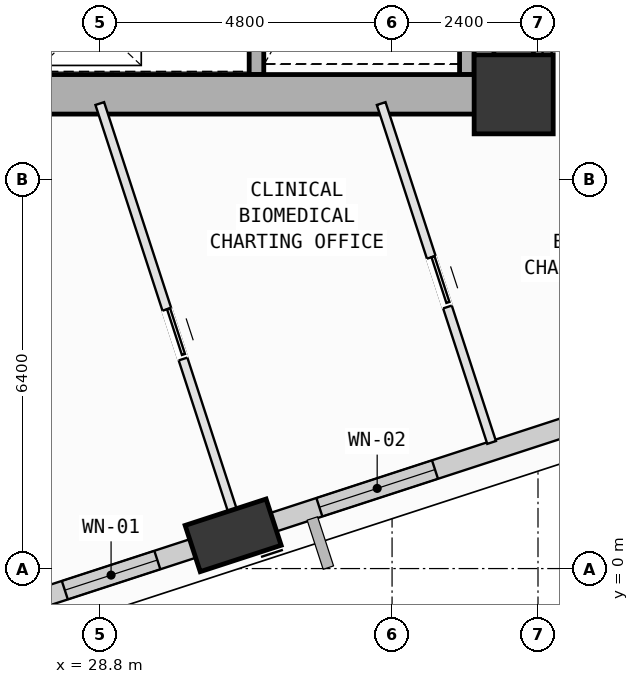
"""IFC4 building model, lengths in metres.
Left out: names, types, materials, properties, quantities, classifications, styles, units other than length and angle.
Written with IfcOpenShell. Run it as: python <this file> out.ifc"""

import sys

from ifc_helpers import new_model, si_unit, direction, frame, frame_2d, origin, origin_2d, place, context, subcontext, project, spatial, rectangle, extrude, element, fill, save


model = new_model("IFC4")
c1 = context("Model", 3, precision=1e-05, world=origin(), true_north=direction((0.0, 1.0)))
c2 = subcontext(c1, "Body", "Model", "MODEL_VIEW")
j1 = project(units=[si_unit("LENGTHUNIT", "METRE"), si_unit("PLANEANGLEUNIT", "RADIAN")], contexts=[c1])
p1 = place(None, origin())
s1 = spatial("IfcSite", under=j1, at=p1, CompositionType="ELEMENT")
p2 = place(p1, origin())
s2 = spatial("IfcBuilding", under=s1, at=p2, CompositionType="ELEMENT")
p3 = place(p2, frame((0.0, 0.0, 100.4)))
s3 = spatial("IfcBuildingStorey", under=s2, at=p3, CompositionType="ELEMENT", Elevation=100.4)
p4 = place(p3, frame((35.6, 7.8, 0.0), z_axis=(0.0, 0.0, 1.0), x_axis=(1.0, 0.0, 0.0)))
e1 = element("IfcColumn", 1, at=p4, inside=s3, PredefinedType="COLUMN", context=c2, shape_type="SweptSolid", body=[
    extrude(rectangle(XDim=1.3, YDim=1.3, at=origin_2d()), origin(), (0.0, 0.0, 1.0), 4.0),
])
p5 = place(p3, frame((30.986, 0.547, 0.002), z_axis=(0.100106568416, -0.00996811003, 0.994926787127), x_axis=(-0.212549228586, 0.976653054141, 0.031171096607)))
e2 = element("IfcColumn", 2, at=p5, inside=s3, PredefinedType="COLUMN", context=c2, shape_type="SweptSolid", body=[
    extrude(rectangle(XDim=1.4, YDim=0.8, at=origin_2d()), origin(), (0.0, 0.0, 1.0), 4.017),
])
p6 = place(p3, frame((30.697, 0.452, 0.0), z_axis=(0.0, 0.0, 1.0), x_axis=(-0.950788287958, -0.309841300479, 0.0)))
e3 = element("IfcWall", 3, at=p6, inside=s3, PredefinedType="SOLIDWALL", context=c2, shape_type="SweptSolid", body=[
    extrude(rectangle(XDim=6.234, YDim=0.32, at=frame_2d((3.117, 0.0))), origin(), (0.0, 0.0, 1.0), 3.165),
])
p7 = place(p6, frame((1.007, 0.0, 0.75)))
e4 = element("IfcOpeningElement", 4, at=p7, cuts=e3, PredefinedType="OPENING", context=c2, shape_type="SweptSolid", body=[
    extrude(rectangle(XDim=1.6, YDim=1.95, at=frame_2d((0.8, 0.975))), frame((0.0, 0.17, 0.0), z_axis=(0.0, -1.0, 0.0), x_axis=(1.0, 0.0, 0.0)), (0.0, 0.0, 1.0), 0.34),
])
p8 = place(p3, frame((37.536, 2.681, 0.0), z_axis=(0.0, 0.0, 1.0), x_axis=(-0.950795017796, -0.309820648334, 0.0)))
e5 = element("IfcWall", 5, at=p8, inside=s3, PredefinedType="SOLIDWALL", context=c2, shape_type="SweptSolid", body=[
    extrude(rectangle(XDim=6.214, YDim=0.32, at=frame_2d((3.107, 0.0))), origin(), (0.0, 0.0, 1.0), 3.165),
])
p9 = place(p8, frame((3.397, 0.0, 0.75)))
e6 = element("IfcOpeningElement", 6, at=p9, cuts=e5, PredefinedType="OPENING", context=c2, shape_type="SweptSolid", body=[
    extrude(rectangle(XDim=2.0, YDim=1.95, at=frame_2d((1.0, 0.975))), frame((0.0, 0.17, 0.0), z_axis=(0.0, -1.0, 0.0), x_axis=(1.0, 0.0, 0.0)), (0.0, 0.0, 1.0), 0.34),
])
for number, where, z_axis, x_axis in (
    (7, (34.83, 15.12, 0.0), (0.0, 0.0, 1.0), (0.0, -1.0, 0.0)),
    (8, (31.37, 8.125, 0.0), (0.0, 0.0, 1.0), (0.0, 1.0, 0.0)),
):
    element("IfcWall", number, at=place(p3, frame(where, z_axis=z_axis, x_axis=x_axis)), inside=s3, PredefinedType="SOLIDWALL", context=c2, shape_type="SweptSolid", body=[
        extrude(rectangle(XDim=6.995, YDim=0.24, at=frame_2d((3.498, 0.0))), origin(), (0.0, 0.0, 1.0), 3.78),
    ])
p10 = place(p3, frame((24.8, 7.8, 0.0), z_axis=(0.0, 0.0, 1.0), x_axis=(1.0, 0.0, 0.0)))
e9 = element("IfcWall", 9, at=p10, inside=s3, PredefinedType="SHEAR", context=c2, shape_type="SweptSolid", body=[
    extrude(rectangle(XDim=10.8, YDim=0.65, at=frame_2d((5.4, 0.0))), origin(), (0.0, 0.0, 1.0), 3.78),
])
p11 = place(p3, frame((35.6, 7.8, 0.0), z_axis=(0.0, 0.0, 1.0), x_axis=(0.0, 1.0, 0.0)))
e10 = element("IfcWall", 10, at=p11, inside=s3, PredefinedType="SHEAR", context=c2, shape_type="SweptSolid", body=[
    extrude(rectangle(XDim=9.0, YDim=0.65, at=frame_2d((4.5, 0.0))), origin(), (0.0, 0.0, 1.0), 3.78),
])
p12 = place(p3, frame((28.793, 7.648, 0.0), z_axis=(0.0, 0.0, 1.0), x_axis=(0.309844655653, -0.950787194573, 0.0)))
e11 = element("IfcWall", 11, at=p12, inside=s3, PredefinedType="PARTITIONING", context=c2, shape_type="SweptSolid", body=[
    extrude(rectangle(XDim=7.662, YDim=0.15, at=frame_2d((3.831, 0.0))), origin(), (0.0, 0.0, 1.0), 3.78),
])
p13 = place(p12, frame((3.559, 0.0, 0.0)))
e12 = element("IfcOpeningElement", 12, at=p13, cuts=e11, PredefinedType="OPENING", context=c2, shape_type="SweptSolid", body=[
    extrude(rectangle(XDim=0.86, YDim=2.06, at=frame_2d((0.43, 1.03))), frame((0.0, 0.085, 0.0), z_axis=(0.0, -1.0, 0.0), x_axis=(1.0, 0.0, 0.0)), (0.0, 0.0, 1.0), 0.17),
])
p14 = place(p3, frame((33.421, 7.648, 0.0), z_axis=(0.0, 0.0, 1.0), x_axis=(0.309798827462, -0.950802127944, 0.0)))
e13 = element("IfcWall", 13, at=p14, inside=s3, PredefinedType="PARTITIONING", context=c2, shape_type="SweptSolid", body=[
    extrude(rectangle(XDim=5.862, YDim=0.15, at=frame_2d((2.931, 0.0))), origin(), (0.0, 0.0, 1.0), 3.78),
])
p15 = place(p14, frame((2.659, 0.0, 0.0)))
e14 = element("IfcOpeningElement", 14, at=p15, cuts=e13, PredefinedType="OPENING", context=c2, shape_type="SweptSolid", body=[
    extrude(rectangle(XDim=0.86, YDim=2.06, at=frame_2d((0.43, 1.03))), frame((0.0, 0.085, 0.0), z_axis=(0.0, -1.0, 0.0), x_axis=(1.0, 0.0, 0.0)), (0.0, 0.0, 1.0), 0.17),
])
p16 = place(p3, frame((36.15, 13.473, 0.0), z_axis=(0.0, 0.0, 1.0), x_axis=(0.309885615187, -0.950773845612, 0.0)))
e15 = element("IfcWall", 15, at=p16, inside=s3, PredefinedType="PARTITIONING", context=c2, shape_type="SweptSolid", body=[
    extrude(rectangle(XDim=10.555, YDim=0.15, at=frame_2d((5.278, 0.0))), origin(), (0.0, 0.0, 1.0), 3.78),
])
p17 = place(p16, frame((4.848, 0.0, 0.0)))
e16 = element("IfcOpeningElement", 16, at=p17, cuts=e15, PredefinedType="OPENING", context=c2, shape_type="SweptSolid", body=[
    extrude(rectangle(XDim=0.86, YDim=2.06, at=frame_2d((0.43, 1.03))), frame((0.0, 0.085, 0.0), z_axis=(0.0, -1.0, 0.0), x_axis=(1.0, 0.0, 0.0)), (0.0, 0.0, 1.0), 0.17),
])
p18 = place(p3, frame((35.6, 7.5, 0.0), z_axis=(0.0, 0.0, 1.0), x_axis=(1.0, 0.0, 0.0)))
e17 = element("IfcWall", 17, at=p18, inside=s3, PredefinedType="PARTITIONING", context=c2, shape_type="SweptSolid", body=[
    extrude(rectangle(XDim=0.55, YDim=0.15, at=frame_2d((0.275, 0.0))), origin(), (0.0, 0.0, 1.0), 2.965),
])
p19 = place(p3, frame((36.15, 7.5, 0.0), z_axis=(0.0, 0.0, 1.0), x_axis=(0.0, 1.0, 0.0)))
e18 = element("IfcWall", 18, at=p19, inside=s3, PredefinedType="PARTITIONING", context=c2, shape_type="SweptSolid", body=[
    extrude(rectangle(XDim=5.134, YDim=0.15, at=frame_2d((2.567, 0.0))), origin(), (0.0, 0.0, 1.0), 3.78),
])
p20 = place(p7, origin())
e19 = element("IfcWindow", 19, at=p20, inside=s3, PartitioningType="SINGLE_PANEL", PredefinedType="WINDOW", context=c2, shape_type="SweptSolid", body=[
    extrude(rectangle(XDim=1.6, YDim=1.95, at=frame_2d((0.8, 0.975))), frame((0.0, 0.03, 0.0), z_axis=(0.0, -1.0, 0.0), x_axis=(1.0, 0.0, 0.0)), (0.0, 0.0, 1.0), 0.06),
])
fill(e4, e19)
p21 = place(p9, origin())
e20 = element("IfcWindow", 20, at=p21, inside=s3, PartitioningType="SINGLE_PANEL", PredefinedType="WINDOW", context=c2, shape_type="SweptSolid", body=[
    extrude(rectangle(XDim=2.0, YDim=1.95, at=frame_2d((1.0, 0.975))), frame((0.0, 0.03, 0.0), z_axis=(0.0, -1.0, 0.0), x_axis=(1.0, 0.0, 0.0)), (0.0, 0.0, 1.0), 0.06),
])
fill(e6, e20)
p22 = place(p15, origin())
e21 = element("IfcDoor", 21, at=p22, inside=s3, OperationType="SLIDING_TO_LEFT", PredefinedType="DOOR", context=c2, shape_type="SweptSolid", body=[
    extrude(rectangle(XDim=0.86, YDim=2.06, at=frame_2d((0.43, 1.03))), frame((0.0, 0.025, 0.0), z_axis=(0.0, -1.0, 0.0), x_axis=(1.0, 0.0, 0.0)), (0.0, 0.0, 1.0), 0.05),
])
fill(e14, e21)
p23 = place(p13, origin())
e22 = element("IfcDoor", 22, at=p23, inside=s3, OperationType="SLIDING_TO_LEFT", PredefinedType="DOOR", context=c2, shape_type="SweptSolid", body=[
    extrude(rectangle(XDim=0.86, YDim=2.06, at=frame_2d((0.43, 1.03))), frame((0.0, 0.025, 0.0), z_axis=(0.0, -1.0, 0.0), x_axis=(1.0, 0.0, 0.0)), (0.0, 0.0, 1.0), 0.05),
])
fill(e12, e22)
save(model, sys.argv[1])
